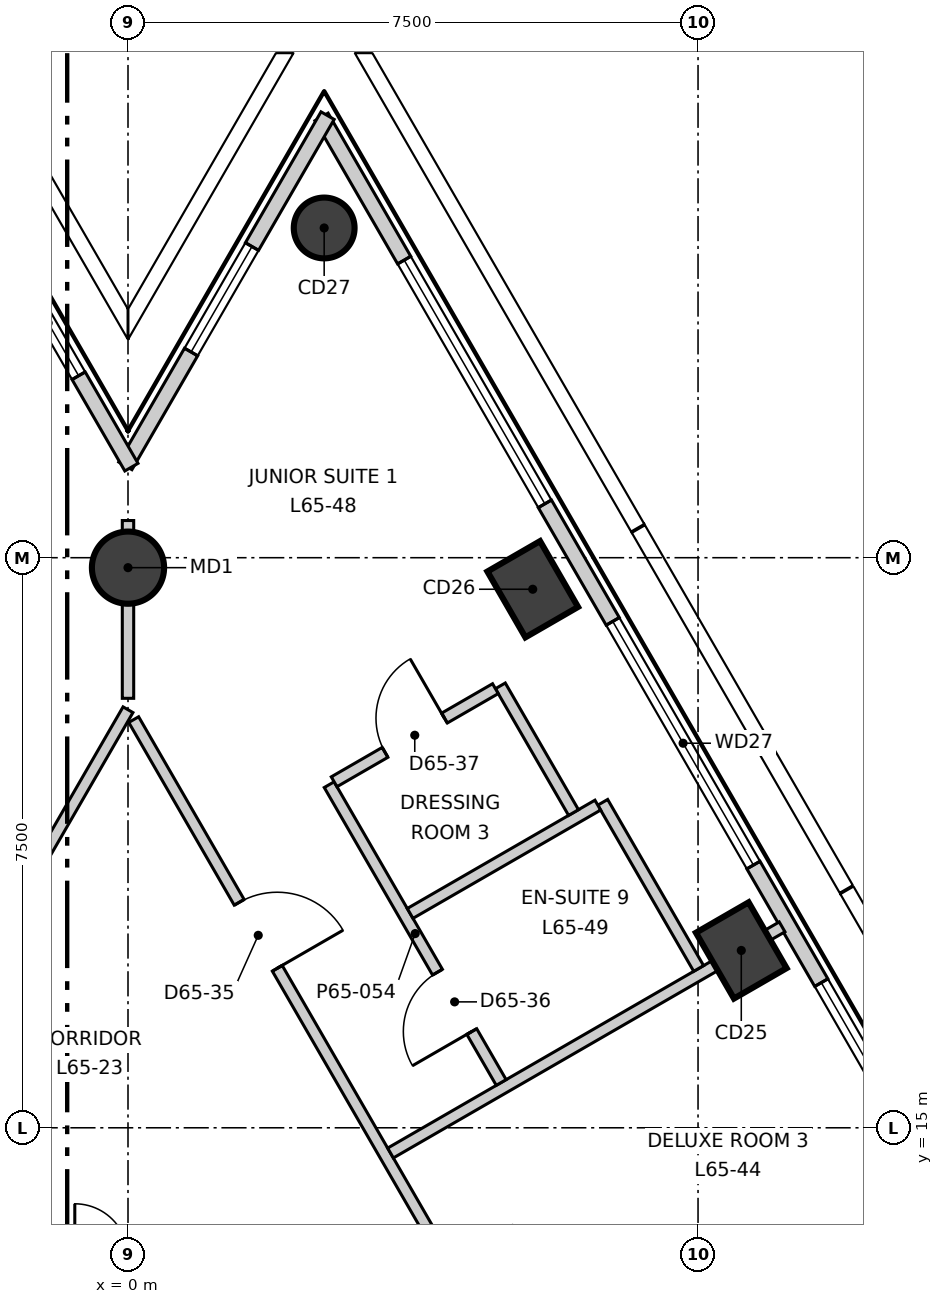
"""IFC4 building model, lengths in metres.
Left out: names, types, materials, properties, quantities, classifications, styles, units other than length and angle.
Written with IfcOpenShell. Run it as: python <this file> out.ifc"""

import sys

from ifc_helpers import new_model, si_unit, direction, frame, frame_2d, origin, origin_2d, place, context, subcontext, project, spatial, rectangle, circle, extrude, element, fill, save


model = new_model("IFC4")
c1 = context("Model", 3, precision=1e-05, world=origin(), true_north=direction((0.0, 1.0)))
c2 = subcontext(c1, "Body", "Model", "MODEL_VIEW")
j1 = project(units=[si_unit("LENGTHUNIT", "METRE"), si_unit("PLANEANGLEUNIT", "RADIAN")], contexts=[c1])
p1 = place(None, origin())
s1 = spatial("IfcSite", under=j1, at=p1, CompositionType="ELEMENT")
p2 = place(p1, origin())
s2 = spatial("IfcBuilding", under=s1, at=p2, CompositionType="ELEMENT")
p3 = place(p2, frame((0.0, 0.0, 279.1)))
s3 = spatial("IfcBuildingStorey", under=s2, at=p3, CompositionType="ELEMENT", Elevation=279.1)
for number, where, z_axis, x_axis in (
    (1, (8.069, 17.333, -0.3), (0.0, 0.0, 1.0), (-0.5, 0.866, 0.0)),
    (2, (5.325, 22.085, -0.3), (0.0, 0.0, 1.0), (-0.5, 0.866, 0.0)),
):
    element("IfcColumn", number, at=place(p3, frame(where, z_axis=z_axis, x_axis=x_axis)), inside=s3, PredefinedType="COLUMN", context=c2, shape_type="SweptSolid", body=[
        extrude(rectangle(XDim=1.0, YDim=0.8, at=origin_2d()), origin(), (0.0, 0.0, 1.0), 3.6),
    ])
p4 = place(p3, frame((2.581, 26.838, -0.3), z_axis=(0.0, 0.0, 1.0), x_axis=(-0.5, 0.866025403784, 0.0)))
e3 = element("IfcColumn", 3, at=p4, inside=s3, PredefinedType="COLUMN", context=c2, shape_type="SweptSolid", body=[
    extrude(circle(Radius=0.4, at=origin_2d()), origin(), (0.0, 0.0, 1.0), 3.6),
])
p5 = place(p3, frame((0.0, 22.369, -0.3), z_axis=(0.0, 0.0, 1.0), x_axis=(1.0, 0.0, 0.0)))
e4 = element("IfcColumn", 4, at=p5, inside=s3, PredefinedType="COLUMN", context=c2, shape_type="SweptSolid", body=[
    extrude(circle(Radius=0.475, at=origin_2d()), origin(), (0.0, 0.0, 1.0), 3.6),
])
p6 = place(p3, frame((25.791, -11.962, 0.0), z_axis=(0.0, 0.0, 1.0), x_axis=(-0.500006870765, 0.86602143691, 0.0)))
e5 = element("IfcWall", 5, at=p6, inside=s3, PredefinedType="ELEMENTEDWALL", context=c2, shape_type="SweptSolid", body=[
    extrude(rectangle(XDim=46.49, YDim=0.2, at=frame_2d((23.245, 0.0))), origin(), (0.0, 0.0, 1.0), 3.3),
])
p7 = place(p6, frame((2.197, 0.0, 0.9)))
e6 = element("IfcOpeningElement", 6, at=p7, cuts=e5, PredefinedType="OPENING", context=c2, shape_type="SweptSolid", body=[
    extrude(rectangle(XDim=3.7, YDim=2.2, at=frame_2d((1.85, 1.1))), frame((0.0, 0.11, 0.0), z_axis=(0.0, -1.0, 0.0), x_axis=(1.0, 0.0, 0.0)), (0.0, 0.0, 1.0), 0.22),
])
p8 = place(p6, frame((7.685, 0.0, 0.9)))
e7 = element("IfcOpeningElement", 7, at=p8, cuts=e5, PredefinedType="OPENING", context=c2, shape_type="SweptSolid", body=[
    extrude(rectangle(XDim=3.7, YDim=2.2, at=frame_2d((1.85, 1.1))), frame((0.0, 0.11, 0.0), z_axis=(0.0, -1.0, 0.0), x_axis=(1.0, 0.0, 0.0)), (0.0, 0.0, 1.0), 0.22),
])
p9 = place(p6, frame((13.173, 0.0, 0.9)))
e8 = element("IfcOpeningElement", 8, at=p9, cuts=e5, PredefinedType="OPENING", context=c2, shape_type="SweptSolid", body=[
    extrude(rectangle(XDim=3.7, YDim=2.2, at=frame_2d((1.85, 1.1))), frame((0.0, 0.11, 0.0), z_axis=(0.0, -1.0, 0.0), x_axis=(1.0, 0.0, 0.0)), (0.0, 0.0, 1.0), 0.22),
])
p10 = place(p6, frame((18.661, 0.0, 0.9)))
e9 = element("IfcOpeningElement", 9, at=p10, cuts=e5, PredefinedType="OPENING", context=c2, shape_type="SweptSolid", body=[
    extrude(rectangle(XDim=3.7, YDim=2.2, at=frame_2d((1.85, 1.1))), frame((0.0, 0.11, 0.0), z_axis=(0.0, -1.0, 0.0), x_axis=(1.0, 0.0, 0.0)), (0.0, 0.0, 1.0), 0.22),
])
p11 = place(p6, frame((24.149, 0.0, 0.9)))
e10 = element("IfcOpeningElement", 10, at=p11, cuts=e5, PredefinedType="OPENING", context=c2, shape_type="SweptSolid", body=[
    extrude(rectangle(XDim=3.7, YDim=2.2, at=frame_2d((1.85, 1.1))), frame((0.0, 0.11, 0.0), z_axis=(0.0, -1.0, 0.0), x_axis=(1.0, 0.0, 0.0)), (0.0, 0.0, 1.0), 0.22),
])
p12 = place(p6, frame((29.637, 0.0, 0.9)))
e11 = element("IfcOpeningElement", 11, at=p12, cuts=e5, PredefinedType="OPENING", context=c2, shape_type="SweptSolid", body=[
    extrude(rectangle(XDim=3.7, YDim=2.2, at=frame_2d((1.85, 1.1))), frame((0.0, 0.11, 0.0), z_axis=(0.0, -1.0, 0.0), x_axis=(1.0, 0.0, 0.0)), (0.0, 0.0, 1.0), 0.22),
])
p13 = place(p6, frame((35.125, 0.0, 0.9)))
e12 = element("IfcOpeningElement", 12, at=p13, cuts=e5, PredefinedType="OPENING", context=c2, shape_type="SweptSolid", body=[
    extrude(rectangle(XDim=3.7, YDim=2.2, at=frame_2d((1.85, 1.1))), frame((0.0, 0.11, 0.0), z_axis=(0.0, -1.0, 0.0), x_axis=(1.0, 0.0, 0.0)), (0.0, 0.0, 1.0), 0.22),
])
p14 = place(p6, frame((40.613, 0.0, 0.9)))
e13 = element("IfcOpeningElement", 13, at=p14, cuts=e5, PredefinedType="OPENING", context=c2, shape_type="SweptSolid", body=[
    extrude(rectangle(XDim=3.7, YDim=2.2, at=frame_2d((1.85, 1.1))), frame((0.0, 0.11, 0.0), z_axis=(0.0, -1.0, 0.0), x_axis=(1.0, 0.0, 0.0)), (0.0, 0.0, 1.0), 0.22),
])
p15 = place(p3, frame((2.626, 28.316, 0.0), z_axis=(0.0, 0.0, 1.0), x_axis=(-0.500071953966, -0.865983857157, 0.0)))
e14 = element("IfcWall", 14, at=p15, inside=s3, PredefinedType="ELEMENTEDWALL", context=c2, shape_type="SweptSolid", body=[
    extrude(rectangle(XDim=5.321, YDim=0.2, at=frame_2d((2.661, 0.0))), origin(), (0.0, 0.0, 1.0), 3.3),
])
p16 = place(p15, frame((1.99, 0.0, 0.9)))
e15 = element("IfcOpeningElement", 15, at=p16, cuts=e14, PredefinedType="OPENING", context=c2, shape_type="SweptSolid", body=[
    extrude(rectangle(XDim=1.6, YDim=2.2, at=frame_2d((0.8, 1.1))), frame((0.0, 0.11, 0.0), z_axis=(0.0, -1.0, 0.0), x_axis=(1.0, 0.0, 0.0)), (0.0, 0.0, 1.0), 0.22),
])
p17 = place(p3, frame((0.045, 23.691, 0.0), z_axis=(0.0, 0.0, 1.0), x_axis=(-0.500052085069, 0.865995330367, 0.0)))
e16 = element("IfcWall", 16, at=p17, inside=s3, PredefinedType="ELEMENTEDWALL", context=c2, shape_type="SweptSolid", body=[
    extrude(rectangle(XDim=5.321, YDim=0.2, at=frame_2d((2.661, 0.0))), origin(), (0.0, 0.0, 1.0), 3.3),
])
p18 = place(p17, frame((1.39, 0.0, 0.9)))
e17 = element("IfcOpeningElement", 17, at=p18, cuts=e16, PredefinedType="OPENING", context=c2, shape_type="SweptSolid", body=[
    extrude(rectangle(XDim=1.6, YDim=2.2, at=frame_2d((0.8, 1.1))), frame((0.0, 0.11, 0.0), z_axis=(0.0, -1.0, 0.0), x_axis=(1.0, 0.0, 0.0)), (0.0, 0.0, 1.0), 0.22),
])
p19 = place(p3, frame((-17.678, -10.119, 0.0), z_axis=(0.0, 0.0, 1.0), x_axis=(0.500003190174, 0.866023561929, 0.0)))
e18 = element("IfcWall", 18, at=p19, inside=s3, PredefinedType="PARTITIONING", context=c2, shape_type="SweptSolid", body=[
    extrude(rectangle(XDim=35.356, YDim=0.15, at=frame_2d((17.678, 0.0))), origin(), (0.0, 0.0, 1.0), 3.3),
])
p20 = place(p19, frame((28.706, 0.0, 0.0)))
e19 = element("IfcOpeningElement", 19, at=p20, cuts=e18, PredefinedType="OPENING", context=c2, shape_type="SweptSolid", body=[
    extrude(rectangle(XDim=1.0, YDim=2.1, at=frame_2d((0.5, 1.05))), frame((0.0, 0.085, 0.0), z_axis=(0.0, -1.0, 0.0), x_axis=(1.0, 0.0, 0.0)), (0.0, 0.0, 1.0), 0.17),
])
p21 = place(p19, frame((18.74, 0.0, 0.0)))
e20 = element("IfcOpeningElement", 20, at=p21, cuts=e18, PredefinedType="OPENING", context=c2, shape_type="SweptSolid", body=[
    extrude(rectangle(XDim=1.0, YDim=2.1, at=frame_2d((0.5, 1.05))), frame((0.0, 0.085, 0.0), z_axis=(0.0, -1.0, 0.0), x_axis=(1.0, 0.0, 0.0)), (0.0, 0.0, 1.0), 0.17),
])
p22 = place(p19, frame((9.352, 0.0, 0.0)))
e21 = element("IfcOpeningElement", 21, at=p22, cuts=e18, PredefinedType="OPENING", context=c2, shape_type="SweptSolid", body=[
    extrude(rectangle(XDim=1.0, YDim=2.1, at=frame_2d((0.5, 1.05))), frame((0.0, 0.085, 0.0), z_axis=(0.0, -1.0, 0.0), x_axis=(1.0, 0.0, 0.0)), (0.0, 0.0, 1.0), 0.17),
])
p23 = place(p19, frame((2.777, 0.0, 0.0)))
e22 = element("IfcOpeningElement", 22, at=p23, cuts=e18, PredefinedType="OPENING", context=c2, shape_type="SweptSolid", body=[
    extrude(rectangle(XDim=1.0, YDim=2.1, at=frame_2d((0.5, 1.05))), frame((0.0, 0.085, 0.0), z_axis=(0.0, -1.0, 0.0), x_axis=(1.0, 0.0, 0.0)), (0.0, 0.0, 1.0), 0.17),
])
p24 = place(p3, frame((0.0, 20.65, 0.0), z_axis=(0.0, 0.0, 1.0), x_axis=(0.0, 1.0, 0.0)))
e23 = element("IfcWall", 23, at=p24, inside=s3, PredefinedType="PARTITIONING", context=c2, shape_type="SweptSolid", body=[
    extrude(rectangle(XDim=2.339, YDim=0.15, at=frame_2d((1.169, 0.0))), origin(), (0.0, 0.0, 1.0), 2.8),
])
p25 = place(p3, frame((0.075, 20.37, 0.0), z_axis=(0.0, 0.0, 1.0), x_axis=(0.500003985697, -0.866023102629, 0.0)))
e24 = element("IfcWall", 24, at=p25, inside=s3, PredefinedType="PARTITIONING", context=c2, shape_type="SweptSolid", body=[
    extrude(rectangle(XDim=35.206, YDim=0.15, at=frame_2d((17.603, 0.0))), origin(), (0.0, 0.0, 1.0), 3.3),
])
p26 = place(p25, frame((31.506, 0.0, 0.0)))
e25 = element("IfcOpeningElement", 25, at=p26, cuts=e24, PredefinedType="OPENING", context=c2, shape_type="SweptSolid", body=[
    extrude(rectangle(XDim=1.0, YDim=2.1, at=frame_2d((0.5, 1.05))), frame((0.0, 0.085, 0.0), z_axis=(0.0, -1.0, 0.0), x_axis=(1.0, 0.0, 0.0)), (0.0, 0.0, 1.0), 0.17),
])
p27 = place(p25, frame((26.529, 0.0, 0.0)))
e26 = element("IfcOpeningElement", 26, at=p27, cuts=e24, PredefinedType="OPENING", context=c2, shape_type="SweptSolid", body=[
    extrude(rectangle(XDim=1.0, YDim=2.1, at=frame_2d((0.5, 1.05))), frame((0.0, 0.085, 0.0), z_axis=(0.0, -1.0, 0.0), x_axis=(1.0, 0.0, 0.0)), (0.0, 0.0, 1.0), 0.17),
])
p28 = place(p25, frame((19.442, 0.0, 0.0)))
e27 = element("IfcOpeningElement", 27, at=p28, cuts=e24, PredefinedType="OPENING", context=c2, shape_type="SweptSolid", body=[
    extrude(rectangle(XDim=1.0, YDim=2.1, at=frame_2d((0.5, 1.05))), frame((0.0, 0.085, 0.0), z_axis=(0.0, -1.0, 0.0), x_axis=(1.0, 0.0, 0.0)), (0.0, 0.0, 1.0), 0.17),
])
p29 = place(p25, frame((8.254, 0.0, 0.0)))
e28 = element("IfcOpeningElement", 28, at=p29, cuts=e24, PredefinedType="OPENING", context=c2, shape_type="SweptSolid", body=[
    extrude(rectangle(XDim=1.0, YDim=2.1, at=frame_2d((0.5, 1.05))), frame((0.0, 0.085, 0.0), z_axis=(0.0, -1.0, 0.0), x_axis=(1.0, 0.0, 0.0)), (0.0, 0.0, 1.0), 0.17),
])
p30 = place(p25, frame((13.754, 0.0, 0.0)))
e29 = element("IfcOpeningElement", 29, at=p30, cuts=e24, PredefinedType="OPENING", context=c2, shape_type="SweptSolid", body=[
    extrude(rectangle(XDim=0.9, YDim=2.1, at=frame_2d((0.45, 1.05))), frame((0.0, 0.085, 0.0), z_axis=(0.0, -1.0, 0.0), x_axis=(1.0, 0.0, 0.0)), (0.0, 0.0, 1.0), 0.17),
])
p31 = place(p25, frame((11.554, 0.0, 0.0)))
e30 = element("IfcOpeningElement", 30, at=p31, cuts=e24, PredefinedType="OPENING", context=c2, shape_type="SweptSolid", body=[
    extrude(rectangle(XDim=0.9, YDim=2.1, at=frame_2d((0.45, 1.05))), frame((0.0, 0.085, 0.0), z_axis=(0.0, -1.0, 0.0), x_axis=(1.0, 0.0, 0.0)), (0.0, 0.0, 1.0), 0.17),
])
p32 = place(p25, frame((2.777, 0.0, 0.0)))
e31 = element("IfcOpeningElement", 31, at=p32, cuts=e24, PredefinedType="OPENING", context=c2, shape_type="SweptSolid", body=[
    extrude(rectangle(XDim=1.0, YDim=2.1, at=frame_2d((0.5, 1.05))), frame((0.0, 0.085, 0.0), z_axis=(0.0, -1.0, 0.0), x_axis=(1.0, 0.0, 0.0)), (0.0, 0.0, 1.0), 0.17),
])
p33 = place(p3, frame((3.454, 14.668, 0.0), z_axis=(0.0, 0.0, 1.0), x_axis=(0.865976450533, 0.500084779935, 0.0)))
e32 = element("IfcWall", 32, at=p33, inside=s3, PredefinedType="PARTITIONING", context=c2, shape_type="SweptSolid", body=[
    extrude(rectangle(XDim=5.949, YDim=0.15, at=frame_2d((2.975, 0.0))), origin(), (0.0, 0.0, 1.0), 3.3),
])
p34 = place(p3, frame((2.647, 19.514, 0.0), z_axis=(0.0, 0.0, 1.0), x_axis=(0.500149036902, -0.865939340188, 0.0)))
e33 = element("IfcWall", 33, at=p34, inside=s3, PredefinedType="PARTITIONING", context=c2, shape_type="SweptSolid", body=[
    extrude(rectangle(XDim=4.524, YDim=0.15, at=frame_2d((2.262, 0.0))), origin(), (0.0, 0.0, 1.0), 3.3),
])
p35 = place(p34, frame((2.85, 0.0, 0.0)))
e34 = element("IfcOpeningElement", 34, at=p35, cuts=e33, PredefinedType="OPENING", context=c2, shape_type="SweptSolid", body=[
    extrude(rectangle(XDim=0.9, YDim=2.1, at=frame_2d((0.45, 1.05))), frame((0.0, 0.085, 0.0), z_axis=(0.0, -1.0, 0.0), x_axis=(1.0, 0.0, 0.0)), (0.0, 0.0, 1.0), 0.17),
])
p36 = place(p3, frame((6.246, 19.282, 0.0), z_axis=(0.0, 0.0, 1.0), x_axis=(0.499956887143, -0.866050293573, 0.0)))
e35 = element("IfcWall", 35, at=p36, inside=s3, PredefinedType="PARTITIONING", context=c2, shape_type="SweptSolid", body=[
    extrude(rectangle(XDim=2.524, YDim=0.15, at=frame_2d((1.262, 0.0))), origin(), (0.0, 0.0, 1.0), 3.3),
])
p37 = place(p3, frame((3.712, 17.82, 0.0), z_axis=(0.0, 0.0, 1.0), x_axis=(0.866090043625, 0.499888023795, 0.0)))
e36 = element("IfcWall", 36, at=p37, inside=s3, PredefinedType="PARTITIONING", context=c2, shape_type="SweptSolid", body=[
    extrude(rectangle(XDim=2.851, YDim=0.15, at=frame_2d((1.425, 0.0))), origin(), (0.0, 0.0, 1.0), 3.3),
])
p38 = place(p3, frame((4.899, 20.814, 0.0), z_axis=(0.0, 0.0, 1.0), x_axis=(0.500271259635, -0.865868735308, 0.0)))
e37 = element("IfcWall", 37, at=p38, inside=s3, PredefinedType="PARTITIONING", context=c2, shape_type="SweptSolid", body=[
    extrude(rectangle(XDim=1.925, YDim=0.15, at=frame_2d((0.963, 0.0))), origin(), (0.0, 0.0, 1.0), 3.3),
])
p39 = place(p3, frame((2.712, 19.552, 0.0), z_axis=(0.0, 0.0, 1.0), x_axis=(0.8660395779, 0.499975448907, 0.0)))
e38 = element("IfcWall", 38, at=p39, inside=s3, PredefinedType="PARTITIONING", context=c2, shape_type="SweptSolid", body=[
    extrude(rectangle(XDim=2.45, YDim=0.15, at=frame_2d((1.225, 0.0))), origin(), (0.0, 0.0, 1.0), 3.3),
])
p40 = place(p39, frame((0.775, 0.0, 0.0)))
e39 = element("IfcOpeningElement", 39, at=p40, cuts=e38, PredefinedType="OPENING", context=c2, shape_type="SweptSolid", body=[
    extrude(rectangle(XDim=0.9, YDim=2.1, at=frame_2d((0.45, 1.05))), frame((0.0, 0.085, 0.0), z_axis=(0.0, -1.0, 0.0), x_axis=(1.0, 0.0, 0.0)), (0.0, 0.0, 1.0), 0.17),
])
p41 = place(p12, origin())
e40 = element("IfcWindow", 40, at=p41, inside=s3, PartitioningType="SINGLE_PANEL", PredefinedType="WINDOW", context=c2, shape_type="SweptSolid", body=[
    extrude(rectangle(XDim=3.7, YDim=2.2, at=frame_2d((1.85, 1.1))), frame((0.0, 0.03, 0.0), z_axis=(0.0, -1.0, 0.0), x_axis=(1.0, 0.0, 0.0)), (0.0, 0.0, 1.0), 0.06),
])
fill(e11, e40)
p42 = place(p13, origin())
e41 = element("IfcWindow", 41, at=p42, inside=s3, PartitioningType="SINGLE_PANEL", PredefinedType="WINDOW", context=c2, shape_type="SweptSolid", body=[
    extrude(rectangle(XDim=3.7, YDim=2.2, at=frame_2d((1.85, 1.1))), frame((0.0, 0.03, 0.0), z_axis=(0.0, -1.0, 0.0), x_axis=(1.0, 0.0, 0.0)), (0.0, 0.0, 1.0), 0.06),
])
fill(e12, e41)
p43 = place(p14, origin())
e42 = element("IfcWindow", 42, at=p43, inside=s3, PartitioningType="SINGLE_PANEL", PredefinedType="WINDOW", context=c2, shape_type="SweptSolid", body=[
    extrude(rectangle(XDim=3.7, YDim=2.2, at=frame_2d((1.85, 1.1))), frame((0.0, 0.03, 0.0), z_axis=(0.0, -1.0, 0.0), x_axis=(1.0, 0.0, 0.0)), (0.0, 0.0, 1.0), 0.06),
])
fill(e13, e42)
p44 = place(p16, origin())
e43 = element("IfcWindow", 43, at=p44, inside=s3, PartitioningType="SINGLE_PANEL", PredefinedType="WINDOW", context=c2, shape_type="SweptSolid", body=[
    extrude(rectangle(XDim=1.6, YDim=2.2, at=frame_2d((0.8, 1.1))), frame((0.0, 0.03, 0.0), z_axis=(0.0, -1.0, 0.0), x_axis=(1.0, 0.0, 0.0)), (0.0, 0.0, 1.0), 0.06),
])
fill(e15, e43)
p45 = place(p18, origin())
e44 = element("IfcWindow", 44, at=p45, inside=s3, PartitioningType="SINGLE_PANEL", PredefinedType="WINDOW", context=c2, shape_type="SweptSolid", body=[
    extrude(rectangle(XDim=1.6, YDim=2.2, at=frame_2d((0.8, 1.1))), frame((0.0, 0.03, 0.0), z_axis=(0.0, -1.0, 0.0), x_axis=(1.0, 0.0, 0.0)), (0.0, 0.0, 1.0), 0.06),
])
fill(e17, e44)
p46 = place(p32, origin())
e45 = element("IfcDoor", 45, at=p46, inside=s3, OperationType="SINGLE_SWING_LEFT", PredefinedType="DOOR", context=c2, shape_type="SweptSolid", body=[
    extrude(rectangle(XDim=1.0, YDim=2.1, at=frame_2d((0.5, 1.05))), frame((0.0, 0.025, 0.0), z_axis=(0.0, -1.0, 0.0), x_axis=(1.0, 0.0, 0.0)), (0.0, 0.0, 1.0), 0.05),
])
fill(e31, e45)
p47 = place(p35, origin())
e46 = element("IfcDoor", 46, at=p47, inside=s3, OperationType="SINGLE_SWING_RIGHT", PredefinedType="DOOR", context=c2, shape_type="SweptSolid", body=[
    extrude(rectangle(XDim=0.9, YDim=2.1, at=frame_2d((0.45, 1.05))), frame((0.0, 0.025, 0.0), z_axis=(0.0, -1.0, 0.0), x_axis=(1.0, 0.0, 0.0)), (0.0, 0.0, 1.0), 0.05),
])
fill(e34, e46)
p48 = place(p40, origin())
e47 = element("IfcDoor", 47, at=p48, inside=s3, OperationType="SINGLE_SWING_LEFT", PredefinedType="DOOR", context=c2, shape_type="SweptSolid", body=[
    extrude(rectangle(XDim=0.9, YDim=2.1, at=frame_2d((0.45, 1.05))), frame((0.0, 0.025, 0.0), z_axis=(0.0, -1.0, 0.0), x_axis=(1.0, 0.0, 0.0)), (0.0, 0.0, 1.0), 0.05),
])
fill(e39, e47)
save(model, sys.argv[1])
